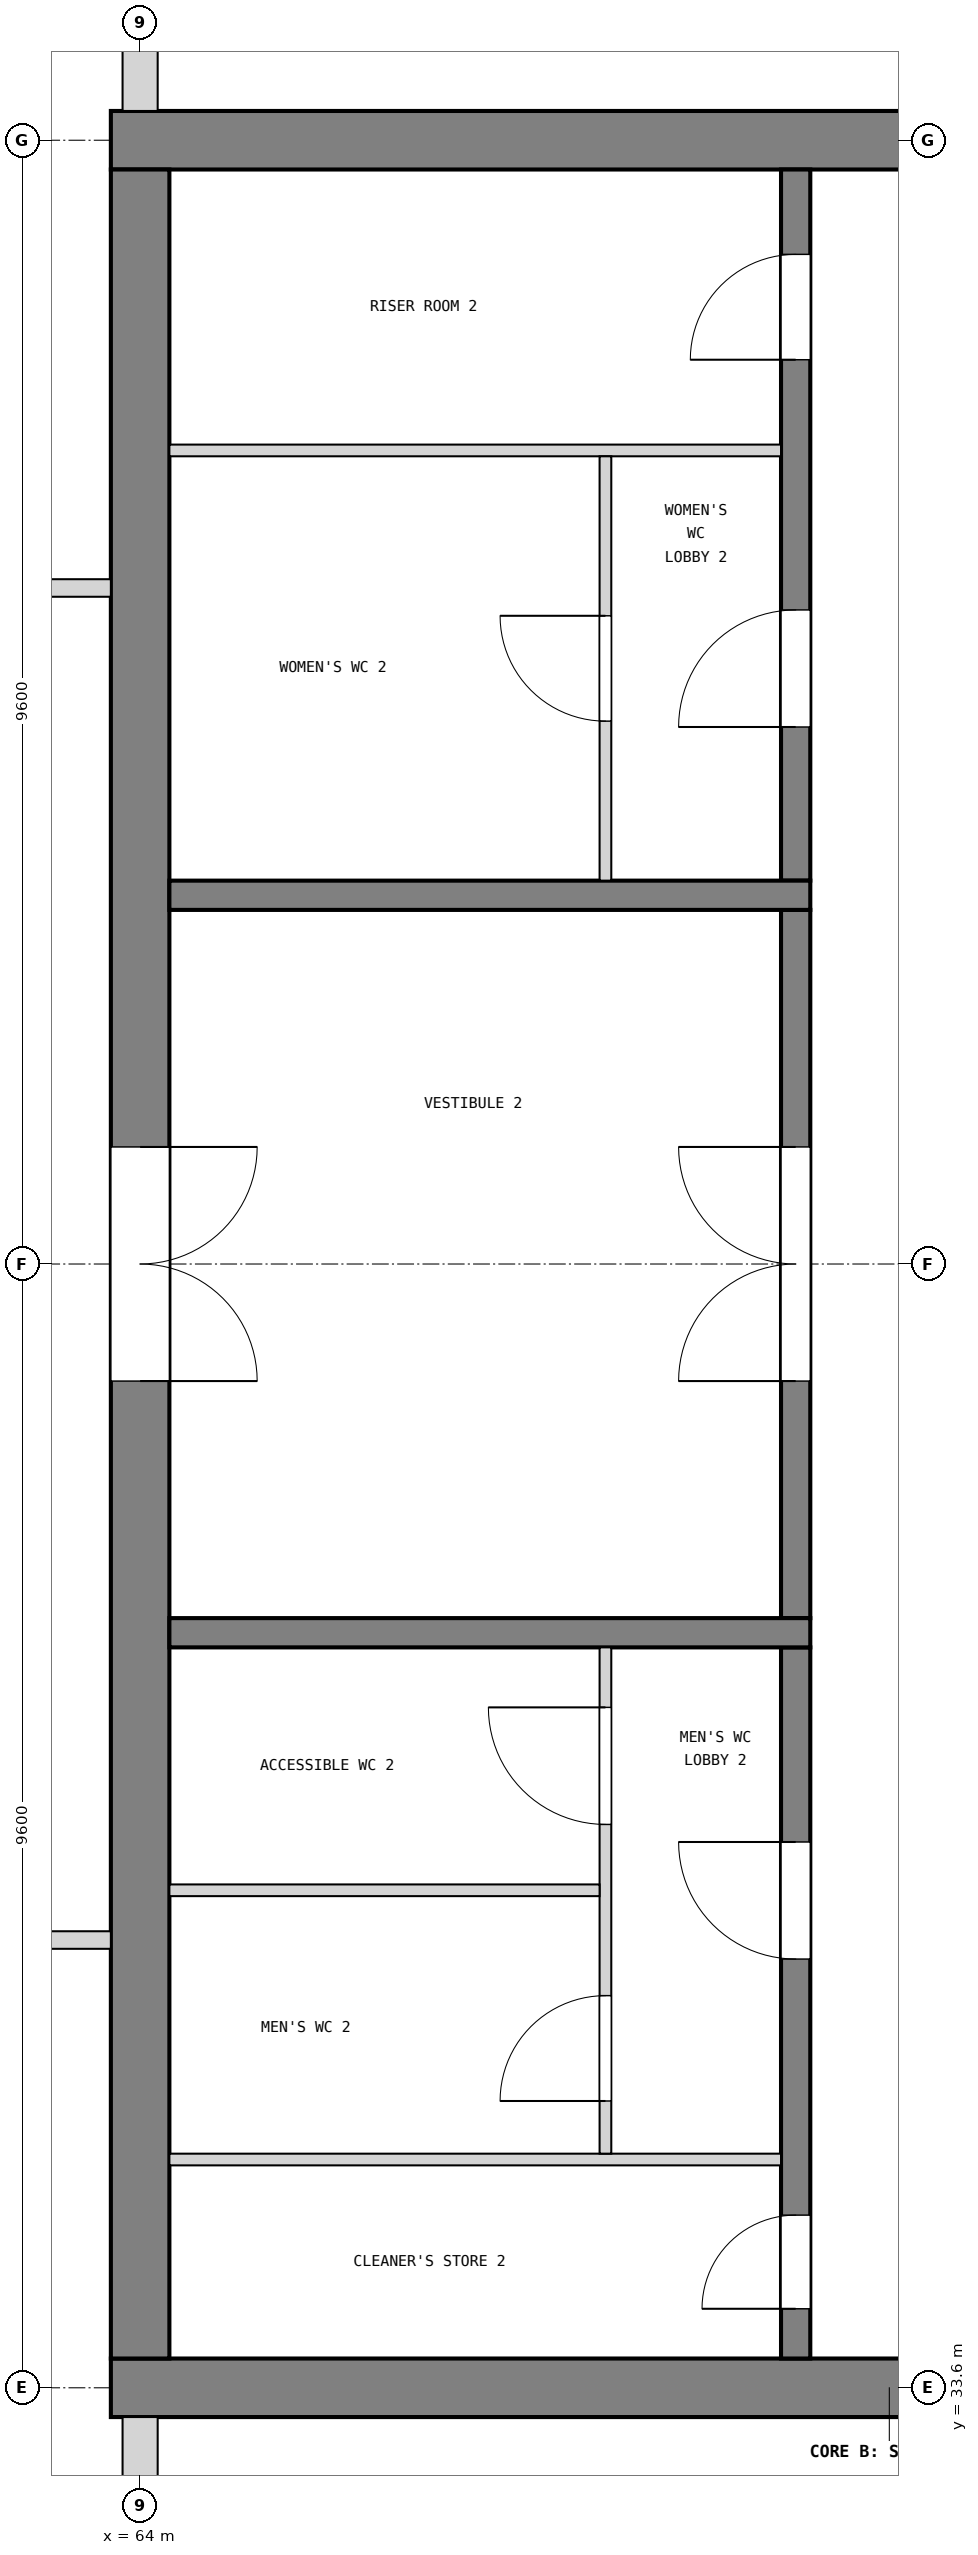
"""IFC4 building model, lengths in metres.
Left out: names, types, materials, properties, quantities, classifications, styles, units other than length and angle.
Written with IfcOpenShell. Run it as: python <this file> out.ifc"""

import sys

from ifc_helpers import new_model, si_unit, direction, frame, frame_2d, origin, place, context, subcontext, project, spatial, rectangle, extrude, element, fill, save


model = new_model("IFC4")
c1 = context("Model", 3, precision=1e-05, world=origin(), true_north=direction((0.0, 1.0)))
c2 = subcontext(c1, "Body", "Model", "MODEL_VIEW")
j1 = project(units=[si_unit("LENGTHUNIT", "METRE"), si_unit("PLANEANGLEUNIT", "RADIAN")], contexts=[c1])
p1 = place(None, origin())
s1 = spatial("IfcSite", under=j1, at=p1, CompositionType="ELEMENT")
p2 = place(p1, origin())
s2 = spatial("IfcBuilding", under=s1, at=p2, CompositionType="ELEMENT")
p3 = place(p2, frame((0.0, 0.0, 48.3)))
s3 = spatial("IfcBuildingStorey", under=s2, at=p3, CompositionType="ELEMENT", Elevation=48.3)
p4 = place(p3, frame((63.75, 52.8, 0.0), z_axis=(0.0, 0.0, 1.0), x_axis=(1.0, 0.0, 0.0)))
e1 = element("IfcWall", 1, at=p4, inside=s3, PredefinedType="SHEAR", context=c2, shape_type="SweptSolid", body=[
    extrude(rectangle(XDim=13.3, YDim=0.5, at=frame_2d((6.65, 0.0))), origin(), (0.0, 0.0, 1.0), 3.9),
])
p5 = place(p4, frame((11.05, 0.0, 1.0)))
e2 = element("IfcOpeningElement", 2, at=p5, cuts=e1, PredefinedType="OPENING", context=c2, shape_type="SweptSolid", body=[
    extrude(rectangle(XDim=0.4, YDim=2.0, at=frame_2d((0.2, 1.0))), frame((0.0, 0.26, 0.0), z_axis=(0.0, -1.0, 0.0), x_axis=(1.0, 0.0, 0.0)), (0.0, 0.0, 1.0), 0.52),
])
p6 = place(p3, frame((63.75, 33.6, 0.0), z_axis=(0.0, 0.0, 1.0), x_axis=(1.0, 0.0, 0.0)))
e3 = element("IfcWall", 3, at=p6, inside=s3, PredefinedType="SHEAR", context=c2, shape_type="SweptSolid", body=[
    extrude(rectangle(XDim=13.3, YDim=0.5, at=frame_2d((6.65, 0.0))), origin(), (0.0, 0.0, 1.0), 3.9),
])
p7 = place(p6, frame((11.05, 0.0, 1.0)))
e4 = element("IfcOpeningElement", 4, at=p7, cuts=e3, PredefinedType="OPENING", context=c2, shape_type="SweptSolid", body=[
    extrude(rectangle(XDim=0.4, YDim=2.0, at=frame_2d((0.2, 1.0))), frame((0.0, 0.26, 0.0), z_axis=(0.0, -1.0, 0.0), x_axis=(1.0, 0.0, 0.0)), (0.0, 0.0, 1.0), 0.52),
])
p8 = place(p3, frame((64.0, 33.85, 0.0), z_axis=(0.0, 0.0, 1.0), x_axis=(0.0, 1.0, 0.0)))
e5 = element("IfcWall", 5, at=p8, inside=s3, PredefinedType="SHEAR", context=c2, shape_type="SweptSolid", body=[
    extrude(rectangle(XDim=18.7, YDim=0.5, at=frame_2d((9.35, 0.0))), origin(), (0.0, 0.0, 1.0), 3.9),
])
p9 = place(p8, frame((8.35, 0.0, 0.0)))
e6 = element("IfcOpeningElement", 6, at=p9, cuts=e5, PredefinedType="OPENING", context=c2, shape_type="SweptSolid", body=[
    extrude(rectangle(XDim=2.0, YDim=2.1, at=frame_2d((1.0, 1.05))), frame((0.0, 0.26, 0.0), z_axis=(0.0, -1.0, 0.0), x_axis=(1.0, 0.0, 0.0)), (0.0, 0.0, 1.0), 0.52),
])
p10 = place(p3, frame((64.0, 31.0, 0.0), z_axis=(0.0, 0.0, 1.0), x_axis=(0.0, 1.0, 0.0)))
e7 = element("IfcWall", 7, at=p10, inside=s3, PredefinedType="SOLIDWALL", context=c2, shape_type="SweptSolid", body=[
    extrude(rectangle(XDim=2.35, YDim=0.3, at=frame_2d((1.175, 0.0))), origin(), (0.0, 0.0, 1.0), 2.88),
])
p11 = place(p3, frame((64.0, 53.05, 0.0), z_axis=(0.0, 0.0, 1.0), x_axis=(0.0, 1.0, 0.0)))
e8 = element("IfcWall", 8, at=p11, inside=s3, PredefinedType="SOLIDWALL", context=c2, shape_type="SweptSolid", body=[
    extrude(rectangle(XDim=2.35, YDim=0.3, at=frame_2d((1.175, 0.0))), origin(), (0.0, 0.0, 1.0), 2.88),
])
p12 = place(p3, frame((69.6, 33.85, 0.0), z_axis=(0.0, 0.0, 1.0), x_axis=(0.0, 1.0, 0.0)))
e9 = element("IfcWall", 9, at=p12, inside=s3, PredefinedType="SOLIDWALL", context=c2, shape_type="SweptSolid", body=[
    extrude(rectangle(XDim=6.075, YDim=0.25, at=frame_2d((3.038, 0.0))), origin(), (0.0, 0.0, 1.0), 3.6),
])
p13 = place(p12, frame((0.425, 0.0, 0.0)))
e10 = element("IfcOpeningElement", 10, at=p13, cuts=e9, PredefinedType="OPENING", context=c2, shape_type="SweptSolid", body=[
    extrude(rectangle(XDim=0.8, YDim=2.1, at=frame_2d((0.4, 1.05))), frame((0.0, 0.135, 0.0), z_axis=(0.0, -1.0, 0.0), x_axis=(1.0, 0.0, 0.0)), (0.0, 0.0, 1.0), 0.27),
])
p14 = place(p12, frame((3.413, 0.0, 0.0)))
e11 = element("IfcOpeningElement", 11, at=p14, cuts=e9, PredefinedType="OPENING", context=c2, shape_type="SweptSolid", body=[
    extrude(rectangle(XDim=1.0, YDim=2.1, at=frame_2d((0.5, 1.05))), frame((0.0, 0.135, 0.0), z_axis=(0.0, -1.0, 0.0), x_axis=(1.0, 0.0, 0.0)), (0.0, 0.0, 1.0), 0.27),
])
p15 = place(p3, frame((69.6, 40.175, 0.0), z_axis=(0.0, 0.0, 1.0), x_axis=(0.0, 1.0, 0.0)))
e12 = element("IfcWall", 12, at=p15, inside=s3, PredefinedType="SOLIDWALL", context=c2, shape_type="SweptSolid", body=[
    extrude(rectangle(XDim=6.05, YDim=0.25, at=frame_2d((3.025, 0.0))), origin(), (0.0, 0.0, 1.0), 3.6),
])
p16 = place(p15, frame((2.025, 0.0, 0.0)))
e13 = element("IfcOpeningElement", 13, at=p16, cuts=e12, PredefinedType="OPENING", context=c2, shape_type="SweptSolid", body=[
    extrude(rectangle(XDim=2.0, YDim=2.1, at=frame_2d((1.0, 1.05))), frame((0.0, 0.135, 0.0), z_axis=(0.0, -1.0, 0.0), x_axis=(1.0, 0.0, 0.0)), (0.0, 0.0, 1.0), 0.27),
])
p17 = place(p3, frame((69.6, 46.475, 0.0), z_axis=(0.0, 0.0, 1.0), x_axis=(0.0, 1.0, 0.0)))
e14 = element("IfcWall", 14, at=p17, inside=s3, PredefinedType="SOLIDWALL", context=c2, shape_type="SweptSolid", body=[
    extrude(rectangle(XDim=6.075, YDim=0.25, at=frame_2d((3.038, 0.0))), origin(), (0.0, 0.0, 1.0), 3.6),
])
p18 = place(p17, frame((1.312, 0.0, 0.0)))
e15 = element("IfcOpeningElement", 15, at=p18, cuts=e14, PredefinedType="OPENING", context=c2, shape_type="SweptSolid", body=[
    extrude(rectangle(XDim=1.0, YDim=2.1, at=frame_2d((0.5, 1.05))), frame((0.0, 0.135, 0.0), z_axis=(0.0, -1.0, 0.0), x_axis=(1.0, 0.0, 0.0)), (0.0, 0.0, 1.0), 0.27),
])
p19 = place(p17, frame((4.45, 0.0, 0.0)))
e16 = element("IfcOpeningElement", 16, at=p19, cuts=e14, PredefinedType="OPENING", context=c2, shape_type="SweptSolid", body=[
    extrude(rectangle(XDim=0.9, YDim=2.1, at=frame_2d((0.45, 1.05))), frame((0.0, 0.135, 0.0), z_axis=(0.0, -1.0, 0.0), x_axis=(1.0, 0.0, 0.0)), (0.0, 0.0, 1.0), 0.27),
])
for number, where, z_axis, x_axis in (
    (17, (69.725, 40.05, 0.0), (0.0, 0.0, 1.0), (-1.0, 0.0, 0.0)),
    (18, (69.725, 46.35, 0.0), (0.0, 0.0, 1.0), (-1.0, 0.0, 0.0)),
):
    element("IfcWall", number, at=place(p3, frame(where, z_axis=z_axis, x_axis=x_axis)), inside=s3, PredefinedType="SOLIDWALL", context=c2, shape_type="SweptSolid", body=[
        extrude(rectangle(XDim=5.475, YDim=0.25, at=frame_2d((2.738, 0.0))), origin(), (0.0, 0.0, 1.0), 3.6),
    ])
p20 = place(p3, frame((69.475, 35.55, 0.0), z_axis=(0.0, 0.0, 1.0), x_axis=(-1.0, 0.0, 0.0)))
e19 = element("IfcWall", 19, at=p20, inside=s3, PredefinedType="PARTITIONING", context=c2, shape_type="SweptSolid", body=[
    extrude(rectangle(XDim=5.225, YDim=0.1, at=frame_2d((2.613, 0.0))), origin(), (0.0, 0.0, 1.0), 3.6),
])
p21 = place(p3, frame((67.975, 35.6, 0.0), z_axis=(0.0, 0.0, 1.0), x_axis=(0.0, 1.0, 0.0)))
e20 = element("IfcWall", 20, at=p21, inside=s3, PredefinedType="PARTITIONING", context=c2, shape_type="SweptSolid", body=[
    extrude(rectangle(XDim=4.325, YDim=0.1, at=frame_2d((2.163, 0.0))), origin(), (0.0, 0.0, 1.0), 3.6),
])
p22 = place(p21, frame((0.45, 0.0, 0.0)))
e21 = element("IfcOpeningElement", 21, at=p22, cuts=e20, PredefinedType="OPENING", context=c2, shape_type="SweptSolid", body=[
    extrude(rectangle(XDim=0.9, YDim=2.1, at=frame_2d((0.45, 1.05))), frame((0.0, 0.06, 0.0), z_axis=(0.0, -1.0, 0.0), x_axis=(1.0, 0.0, 0.0)), (0.0, 0.0, 1.0), 0.12),
])
p23 = place(p21, frame((2.812, 0.0, 0.0)))
e22 = element("IfcOpeningElement", 22, at=p23, cuts=e20, PredefinedType="OPENING", context=c2, shape_type="SweptSolid", body=[
    extrude(rectangle(XDim=1.0, YDim=2.1, at=frame_2d((0.5, 1.05))), frame((0.0, 0.06, 0.0), z_axis=(0.0, -1.0, 0.0), x_axis=(1.0, 0.0, 0.0)), (0.0, 0.0, 1.0), 0.12),
])
p24 = place(p3, frame((67.925, 37.85, 0.0), z_axis=(0.0, 0.0, 1.0), x_axis=(-1.0, 0.0, 0.0)))
e23 = element("IfcWall", 23, at=p24, inside=s3, PredefinedType="PARTITIONING", context=c2, shape_type="SweptSolid", body=[
    extrude(rectangle(XDim=3.675, YDim=0.1, at=frame_2d((1.837, 0.0))), origin(), (0.0, 0.0, 1.0), 3.6),
])
p25 = place(p3, frame((69.475, 50.15, 0.0), z_axis=(0.0, 0.0, 1.0), x_axis=(-1.0, 0.0, 0.0)))
e24 = element("IfcWall", 24, at=p25, inside=s3, PredefinedType="PARTITIONING", context=c2, shape_type="SweptSolid", body=[
    extrude(rectangle(XDim=5.225, YDim=0.1, at=frame_2d((2.613, 0.0))), origin(), (0.0, 0.0, 1.0), 3.6),
])
p26 = place(p3, frame((67.975, 46.475, 0.0), z_axis=(0.0, 0.0, 1.0), x_axis=(0.0, 1.0, 0.0)))
e25 = element("IfcWall", 25, at=p26, inside=s3, PredefinedType="PARTITIONING", context=c2, shape_type="SweptSolid", body=[
    extrude(rectangle(XDim=3.625, YDim=0.1, at=frame_2d((1.812, 0.0))), origin(), (0.0, 0.0, 1.0), 3.6),
])
p27 = place(p26, frame((1.363, 0.0, 0.0)))
e26 = element("IfcOpeningElement", 26, at=p27, cuts=e25, PredefinedType="OPENING", context=c2, shape_type="SweptSolid", body=[
    extrude(rectangle(XDim=0.9, YDim=2.1, at=frame_2d((0.45, 1.05))), frame((0.0, 0.06, 0.0), z_axis=(0.0, -1.0, 0.0), x_axis=(1.0, 0.0, 0.0)), (0.0, 0.0, 1.0), 0.12),
])
p28 = place(p3, frame((57.78, 37.425, 0.0), z_axis=(0.0, 0.0, 1.0), x_axis=(1.0, 0.0, 0.0)))
e27 = element("IfcWall", 27, at=p28, inside=s3, PredefinedType="PARTITIONING", context=c2, shape_type="SweptSolid", body=[
    extrude(rectangle(XDim=5.97, YDim=0.15, at=frame_2d((2.985, 0.0))), origin(), (0.0, 0.0, 1.0), 3.68),
])
p29 = place(p28, frame((2.52, 0.0, 0.0)))
e28 = element("IfcOpeningElement", 28, at=p29, cuts=e27, PredefinedType="OPENING", context=c2, shape_type="SweptSolid", body=[
    extrude(rectangle(XDim=1.0, YDim=2.1, at=frame_2d((0.5, 1.05))), frame((0.0, 0.085, 0.0), z_axis=(0.0, -1.0, 0.0), x_axis=(1.0, 0.0, 0.0)), (0.0, 0.0, 1.0), 0.17),
])
p30 = place(p3, frame((54.4, 48.975, 0.0), z_axis=(0.0, 0.0, 1.0), x_axis=(1.0, 0.0, 0.0)))
e29 = element("IfcWall", 29, at=p30, inside=s3, PredefinedType="PARTITIONING", context=c2, shape_type="SweptSolid", body=[
    extrude(rectangle(XDim=9.35, YDim=0.15, at=frame_2d((4.675, 0.0))), origin(), (0.0, 0.0, 1.0), 3.68),
])
p31 = place(p30, frame((4.2, 0.0, 0.0)))
e30 = element("IfcOpeningElement", 30, at=p31, cuts=e29, PredefinedType="OPENING", context=c2, shape_type="SweptSolid", body=[
    extrude(rectangle(XDim=1.0, YDim=2.1, at=frame_2d((0.5, 1.05))), frame((0.0, 0.085, 0.0), z_axis=(0.0, -1.0, 0.0), x_axis=(1.0, 0.0, 0.0)), (0.0, 0.0, 1.0), 0.17),
])
p32 = place(p16, origin())
e31 = element("IfcDoor", 31, at=p32, inside=s3, OperationType="DOUBLE_DOOR_SINGLE_SWING", PredefinedType="DOOR", context=c2, shape_type="SweptSolid", body=[
    extrude(rectangle(XDim=2.0, YDim=2.1, at=frame_2d((1.0, 1.05))), frame((0.0, 0.025, 0.0), z_axis=(0.0, -1.0, 0.0), x_axis=(1.0, 0.0, 0.0)), (0.0, 0.0, 1.0), 0.05),
])
fill(e13, e31)
p33 = place(p9, frame((2.0, 0.0, 0.0), z_axis=(0.0, 0.0, 1.0), x_axis=(-1.0, 0.0, 0.0)))
e32 = element("IfcDoor", 32, at=p33, inside=s3, OperationType="DOUBLE_DOOR_SINGLE_SWING", PredefinedType="DOOR", context=c2, shape_type="SweptSolid", body=[
    extrude(rectangle(XDim=2.0, YDim=2.1, at=frame_2d((1.0, 1.05))), frame((0.0, 0.025, 0.0), z_axis=(0.0, -1.0, 0.0), x_axis=(1.0, 0.0, 0.0)), (0.0, 0.0, 1.0), 0.05),
])
fill(e6, e32)
p34 = place(p13, origin())
e33 = element("IfcDoor", 33, at=p34, inside=s3, OperationType="SINGLE_SWING_LEFT", PredefinedType="DOOR", context=c2, shape_type="SweptSolid", body=[
    extrude(rectangle(XDim=0.8, YDim=2.1, at=frame_2d((0.4, 1.05))), frame((0.0, 0.025, 0.0), z_axis=(0.0, -1.0, 0.0), x_axis=(1.0, 0.0, 0.0)), (0.0, 0.0, 1.0), 0.05),
])
fill(e10, e33)
p35 = place(p14, origin())
e34 = element("IfcDoor", 34, at=p35, inside=s3, OperationType="SINGLE_SWING_RIGHT", PredefinedType="DOOR", context=c2, shape_type="SweptSolid", body=[
    extrude(rectangle(XDim=1.0, YDim=2.1, at=frame_2d((0.5, 1.05))), frame((0.0, 0.025, 0.0), z_axis=(0.0, -1.0, 0.0), x_axis=(1.0, 0.0, 0.0)), (0.0, 0.0, 1.0), 0.05),
])
fill(e11, e34)
p36 = place(p22, origin())
e35 = element("IfcDoor", 35, at=p36, inside=s3, OperationType="SINGLE_SWING_LEFT", PredefinedType="DOOR", context=c2, shape_type="SweptSolid", body=[
    extrude(rectangle(XDim=0.9, YDim=2.1, at=frame_2d((0.45, 1.05))), frame((0.0, 0.025, 0.0), z_axis=(0.0, -1.0, 0.0), x_axis=(1.0, 0.0, 0.0)), (0.0, 0.0, 1.0), 0.05),
])
fill(e21, e35)
p37 = place(p23, origin())
e36 = element("IfcDoor", 36, at=p37, inside=s3, OperationType="SINGLE_SWING_RIGHT", PredefinedType="DOOR", context=c2, shape_type="SweptSolid", body=[
    extrude(rectangle(XDim=1.0, YDim=2.1, at=frame_2d((0.5, 1.05))), frame((0.0, 0.025, 0.0), z_axis=(0.0, -1.0, 0.0), x_axis=(1.0, 0.0, 0.0)), (0.0, 0.0, 1.0), 0.05),
])
fill(e22, e36)
p38 = place(p18, origin())
e37 = element("IfcDoor", 37, at=p38, inside=s3, OperationType="SINGLE_SWING_LEFT", PredefinedType="DOOR", context=c2, shape_type="SweptSolid", body=[
    extrude(rectangle(XDim=1.0, YDim=2.1, at=frame_2d((0.5, 1.05))), frame((0.0, 0.025, 0.0), z_axis=(0.0, -1.0, 0.0), x_axis=(1.0, 0.0, 0.0)), (0.0, 0.0, 1.0), 0.05),
])
fill(e15, e37)
p39 = place(p27, origin())
e38 = element("IfcDoor", 38, at=p39, inside=s3, OperationType="SINGLE_SWING_RIGHT", PredefinedType="DOOR", context=c2, shape_type="SweptSolid", body=[
    extrude(rectangle(XDim=0.9, YDim=2.1, at=frame_2d((0.45, 1.05))), frame((0.0, 0.025, 0.0), z_axis=(0.0, -1.0, 0.0), x_axis=(1.0, 0.0, 0.0)), (0.0, 0.0, 1.0), 0.05),
])
fill(e26, e38)
p40 = place(p19, origin())
e39 = element("IfcDoor", 39, at=p40, inside=s3, OperationType="SINGLE_SWING_LEFT", PredefinedType="DOOR", context=c2, shape_type="SweptSolid", body=[
    extrude(rectangle(XDim=0.9, YDim=2.1, at=frame_2d((0.45, 1.05))), frame((0.0, 0.025, 0.0), z_axis=(0.0, -1.0, 0.0), x_axis=(1.0, 0.0, 0.0)), (0.0, 0.0, 1.0), 0.05),
])
fill(e16, e39)
save(model, sys.argv[1])
